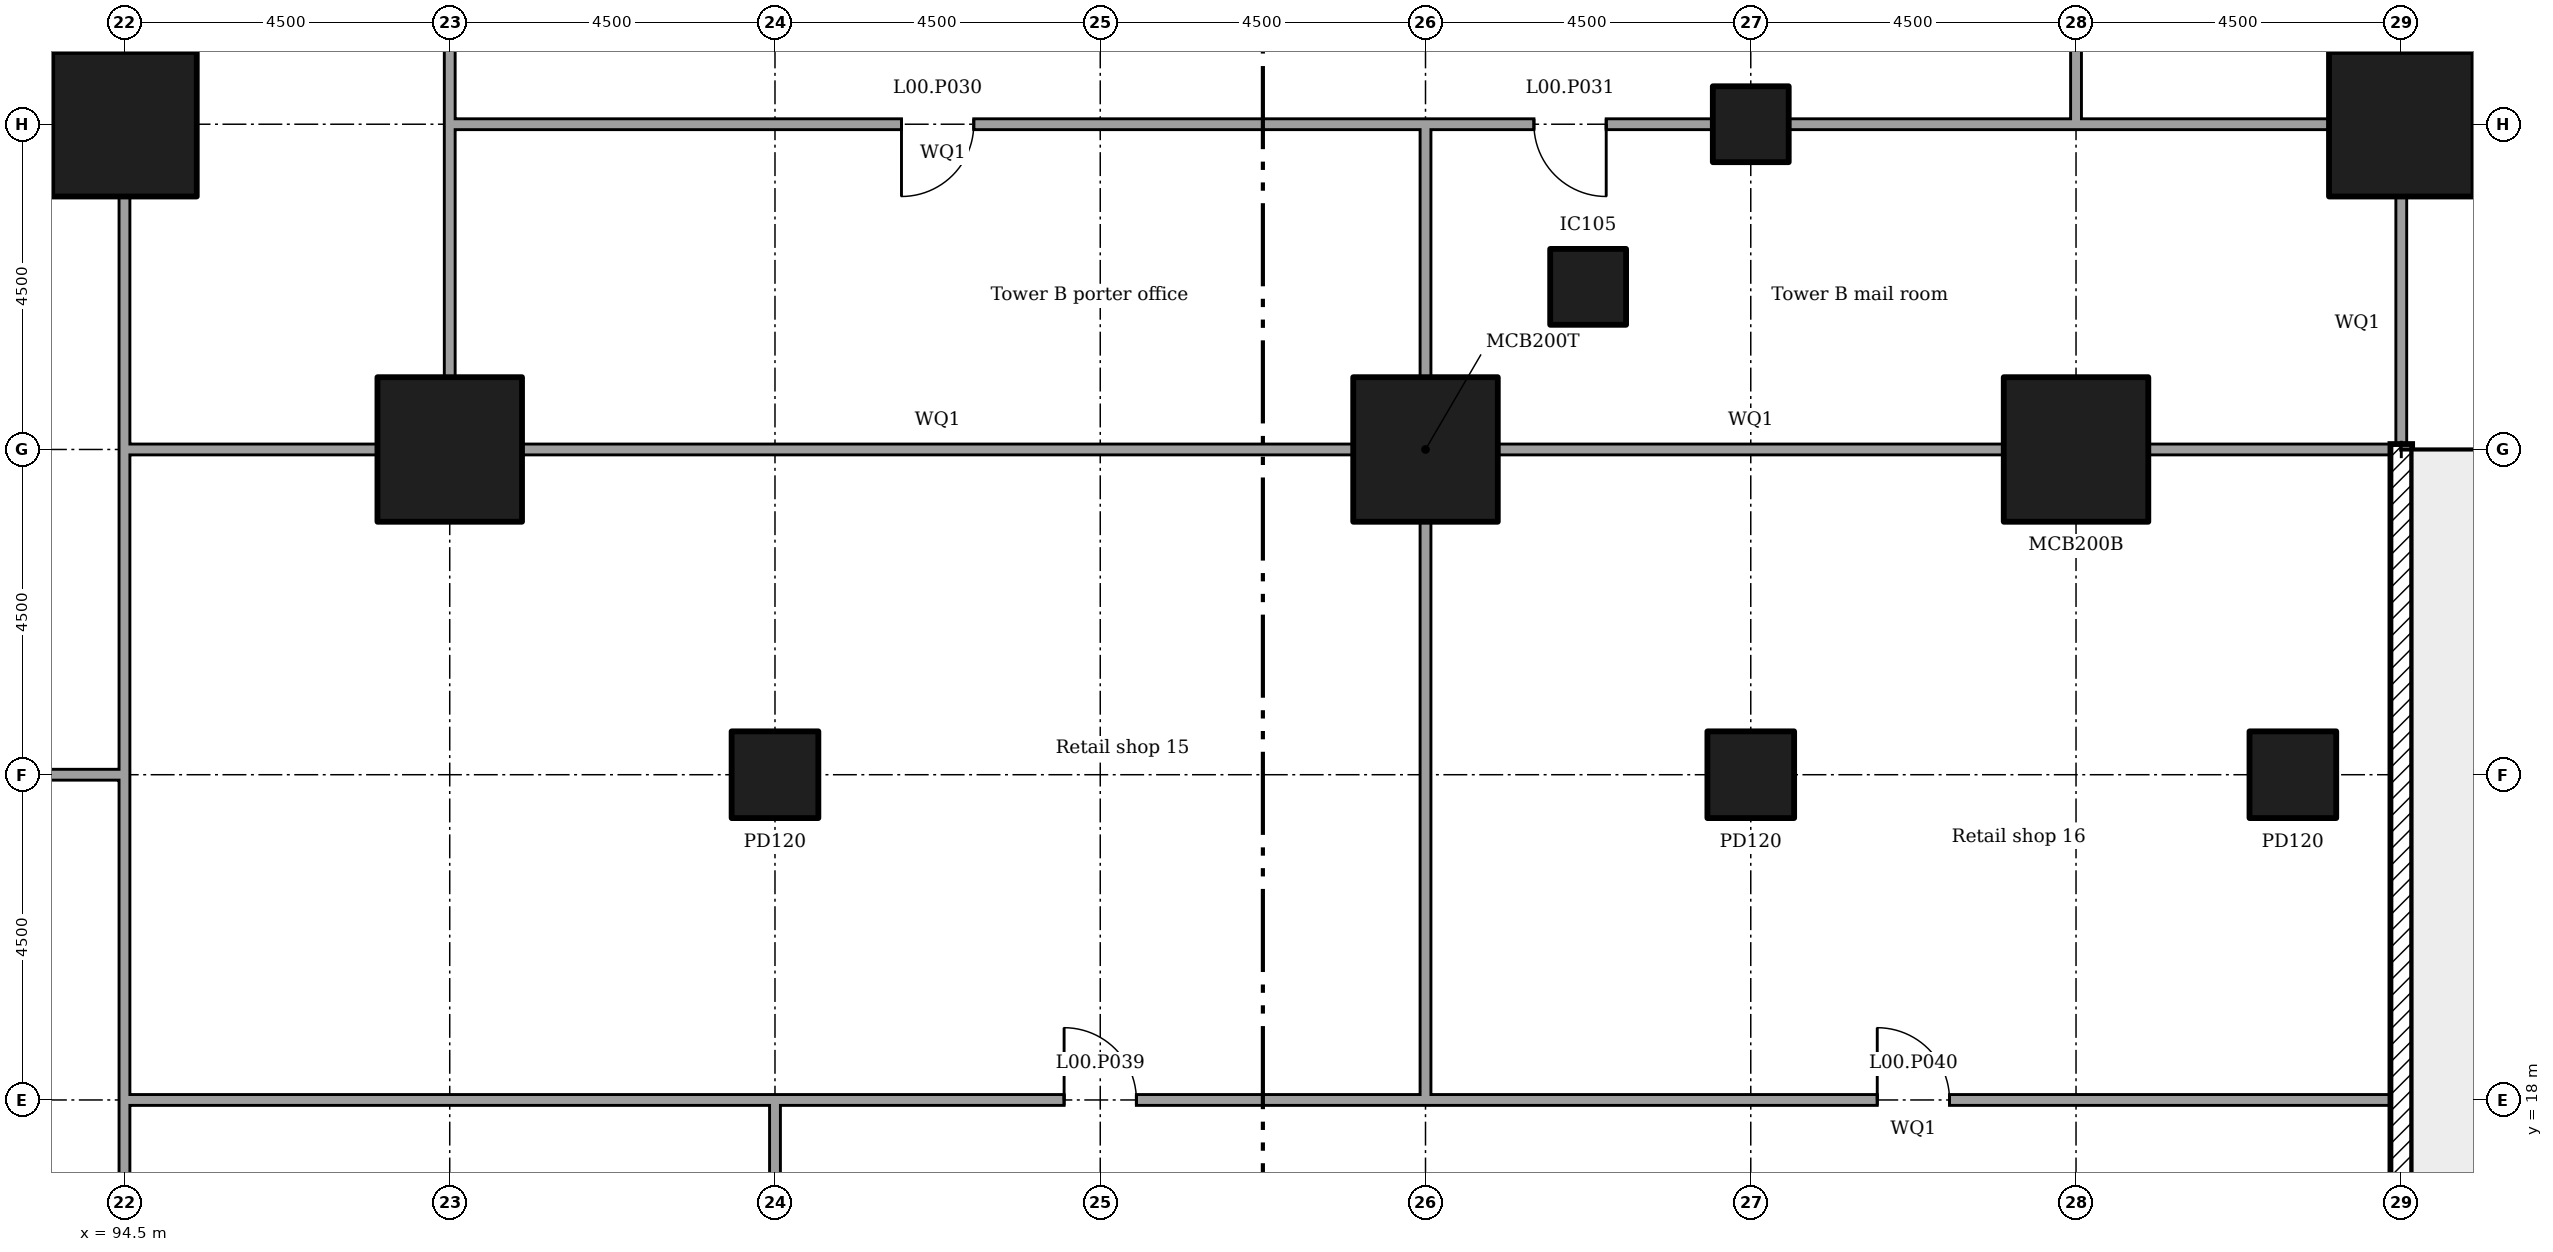
"""IFC4 building model, lengths in metres.
Left out: names, types, materials, properties, quantities, classifications, styles, units other than length and angle.
Written with IfcOpenShell. Run it as: python <this file> out.ifc"""

import sys

from ifc_helpers import new_model, si_unit, direction, frame, frame_2d, origin, origin_2d, place, context, subcontext, project, spatial, rectangle, extrude, element, fill, save


model = new_model("IFC4")
c1 = context("Model", 3, precision=1e-05, world=origin(), true_north=direction((0.0, 1.0)))
c2 = subcontext(c1, "Body", "Model", "MODEL_VIEW")
j1 = project(units=[si_unit("LENGTHUNIT", "METRE"), si_unit("PLANEANGLEUNIT", "RADIAN")], contexts=[c1])
p1 = place(None, origin())
s1 = spatial("IfcSite", under=j1, at=p1, CompositionType="ELEMENT")
p2 = place(p1, origin())
s2 = spatial("IfcBuilding", under=s1, at=p2, CompositionType="ELEMENT")
p3 = place(p2, origin())
s3 = spatial("IfcBuildingStorey", under=s2, at=p3, CompositionType="ELEMENT", Elevation=0.0)
for number, where in (
    (1, (94.5, 31.5, 0.0)),
    (2, (99.0, 27.0, 0.0)),
    (3, (112.5, 27.0, 0.0)),
    (4, (121.5, 27.0, 0.0)),
    (5, (126.0, 31.5, 0.0)),
):
    element("IfcColumn", number, at=place(p3, frame(where)), inside=s3, PredefinedType="COLUMN", context=c2, shape_type="SweptSolid", body=[
        extrude(rectangle(XDim=2.0, YDim=2.0, at=origin_2d()), origin(), (0.0, 0.0, 1.0), 6.0),
    ])
for number, where in (
    (6, (114.75, 29.25, 0.0)),
    (7, (117.0, 31.5, 0.0)),
):
    element("IfcColumn", number, at=place(p3, frame(where)), inside=s3, PredefinedType="COLUMN", context=c2, shape_type="SweptSolid", body=[
        extrude(rectangle(XDim=1.05, YDim=1.05, at=origin_2d()), origin(), (0.0, 0.0, 1.0), 6.0),
    ])
for number, where in (
    (8, (103.5, 22.5, 0.0)),
    (9, (117.0, 22.5, 0.0)),
    (10, (124.5, 22.5, 0.0)),
):
    element("IfcColumn", number, at=place(p3, frame(where)), inside=s3, PredefinedType="COLUMN", context=c2, shape_type="SweptSolid", body=[
        extrude(rectangle(XDim=1.2, YDim=1.2, at=origin_2d()), origin(), (0.0, 0.0, 1.0), 6.0),
    ])
p4 = place(p3, frame((90.595, 22.5, 0.0)))
e11 = element("IfcWall", 11, at=p4, inside=s3, PredefinedType="PARTITIONING", context=c2, shape_type="SweptSolid", body=[
    extrude(rectangle(XDim=3.98, YDim=0.15, at=frame_2d((1.99, 0.0))), origin(), (0.0, 0.0, 1.0), 5.55),
])
p5 = place(p3, frame((94.5, 9.0, 0.0), z_axis=(0.0, 0.0, 1.0), x_axis=(0.0, 1.0, 0.0)))
e12 = element("IfcWall", 12, at=p5, inside=s3, PredefinedType="PARTITIONING", context=c2, shape_type="SweptSolid", body=[
    extrude(rectangle(XDim=9.075, YDim=0.15, at=frame_2d((4.538, 0.0))), origin(), (0.0, 0.0, 1.0), 5.55),
])
p6 = place(p5, frame((4.0, 0.0, 0.0)))
e13 = element("IfcOpeningElement", 13, at=p6, cuts=e12, PredefinedType="OPENING", context=c2, shape_type="SweptSolid", body=[
    extrude(rectangle(XDim=1.0, YDim=2.1, at=frame_2d((0.5, 1.05))), frame((0.0, 0.085, 0.0), z_axis=(0.0, -1.0, 0.0), x_axis=(1.0, 0.0, 0.0)), (0.0, 0.0, 1.0), 0.17),
])
p7 = place(p3, frame((94.5, 18.0, 0.0), z_axis=(0.0, 0.0, 1.0), x_axis=(0.0, 1.0, 0.0)))
e14 = element("IfcWall", 14, at=p7, inside=s3, PredefinedType="PARTITIONING", context=c2, shape_type="SweptSolid", body=[
    extrude(rectangle(XDim=4.425, YDim=0.15, at=frame_2d((2.212, 0.0))), origin(), (0.0, 0.0, 1.0), 5.55),
])
p8 = place(p3, frame((94.5, 26.925, 0.0), z_axis=(0.0, 0.0, 1.0), x_axis=(0.0, 1.0, 0.0)))
e15 = element("IfcWall", 15, at=p8, inside=s3, PredefinedType="PARTITIONING", context=c2, shape_type="SweptSolid", body=[
    extrude(rectangle(XDim=3.58, YDim=0.15, at=frame_2d((1.79, 0.0))), origin(), (0.0, 0.0, 1.0), 5.55),
])
p9 = place(p3, frame((94.5, 32.495, 0.0), z_axis=(0.0, 0.0, 1.0), x_axis=(0.0, 1.0, 0.0)))
e16 = element("IfcWall", 16, at=p9, inside=s3, PredefinedType="PARTITIONING", context=c2, shape_type="SweptSolid", body=[
    extrude(rectangle(XDim=11.51, YDim=0.15, at=frame_2d((5.755, 0.0))), origin(), (0.0, 0.0, 1.0), 5.55),
])
p10 = place(p9, frame((4.85, 0.0, 0.0)))
e17 = element("IfcOpeningElement", 17, at=p10, cuts=e16, PredefinedType="OPENING", context=c2, shape_type="SweptSolid", body=[
    extrude(rectangle(XDim=1.8, YDim=2.1, at=frame_2d((0.9, 1.05))), frame((0.0, 0.085, 0.0), z_axis=(0.0, -1.0, 0.0), x_axis=(1.0, 0.0, 0.0)), (0.0, 0.0, 1.0), 0.17),
])
p11 = place(p3, frame((94.5, 22.5, 0.0), z_axis=(0.0, 0.0, 1.0), x_axis=(0.0, 1.0, 0.0)))
e18 = element("IfcWall", 18, at=p11, inside=s3, PredefinedType="PARTITIONING", context=c2, shape_type="SweptSolid", body=[
    extrude(rectangle(XDim=4.5, YDim=0.15, at=frame_2d((2.25, 0.0))), origin(), (0.0, 0.0, 1.0), 5.55),
])
p12 = place(p3, frame((99.0, 31.425, 0.0), z_axis=(0.0, 0.0, 1.0), x_axis=(0.0, 1.0, 0.0)))
e19 = element("IfcWall", 19, at=p12, inside=s3, PredefinedType="PARTITIONING", context=c2, shape_type="SweptSolid", body=[
    extrude(rectangle(XDim=4.055, YDim=0.15, at=frame_2d((2.027, 0.0))), origin(), (0.0, 0.0, 1.0), 5.55),
])
p13 = place(p12, frame((1.175, 0.0, 0.0)))
e20 = element("IfcOpeningElement", 20, at=p13, cuts=e19, PredefinedType="OPENING", context=c2, shape_type="SweptSolid", body=[
    extrude(rectangle(XDim=1.8, YDim=2.1, at=frame_2d((0.9, 1.05))), frame((0.0, 0.085, 0.0), z_axis=(0.0, -1.0, 0.0), x_axis=(1.0, 0.0, 0.0)), (0.0, 0.0, 1.0), 0.17),
])
p14 = place(p3, frame((99.0, 27.995, 0.0), z_axis=(0.0, 0.0, 1.0), x_axis=(0.0, 1.0, 0.0)))
e21 = element("IfcWall", 21, at=p14, inside=s3, PredefinedType="PARTITIONING", context=c2, shape_type="SweptSolid", body=[
    extrude(rectangle(XDim=3.505, YDim=0.15, at=frame_2d((1.752, 0.0))), origin(), (0.0, 0.0, 1.0), 5.55),
])
p15 = place(p3, frame((94.575, 27.0, 0.0)))
e22 = element("IfcWall", 22, at=p15, inside=s3, PredefinedType="PARTITIONING", context=c2, shape_type="SweptSolid", body=[
    extrude(rectangle(XDim=3.43, YDim=0.15, at=frame_2d((1.715, 0.0))), origin(), (0.0, 0.0, 1.0), 5.55),
])
p16 = place(p3, frame((99.075, 31.5, 0.0)))
e23 = element("IfcWall", 23, at=p16, inside=s3, PredefinedType="PARTITIONING", context=c2, shape_type="SweptSolid", body=[
    extrude(rectangle(XDim=13.5, YDim=0.15, at=frame_2d((6.75, 0.0))), origin(), (0.0, 0.0, 1.0), 5.55),
])
p17 = place(p16, frame((6.175, 0.0, 0.0)))
e24 = element("IfcOpeningElement", 24, at=p17, cuts=e23, PredefinedType="OPENING", context=c2, shape_type="SweptSolid", body=[
    extrude(rectangle(XDim=1.0, YDim=2.1, at=frame_2d((0.5, 1.05))), frame((0.0, 0.085, 0.0), z_axis=(0.0, -1.0, 0.0), x_axis=(1.0, 0.0, 0.0)), (0.0, 0.0, 1.0), 0.17),
])
p18 = place(p3, frame((112.5, 31.5, 0.0)))
e25 = element("IfcWall", 25, at=p18, inside=s3, PredefinedType="PARTITIONING", context=c2, shape_type="SweptSolid", body=[
    extrude(rectangle(XDim=3.98, YDim=0.15, at=frame_2d((1.99, 0.0))), origin(), (0.0, 0.0, 1.0), 5.55),
])
p19 = place(p18, frame((1.5, 0.0, 0.0)))
e26 = element("IfcOpeningElement", 26, at=p19, cuts=e25, PredefinedType="OPENING", context=c2, shape_type="SweptSolid", body=[
    extrude(rectangle(XDim=1.0, YDim=2.1, at=frame_2d((0.5, 1.05))), frame((0.0, 0.085, 0.0), z_axis=(0.0, -1.0, 0.0), x_axis=(1.0, 0.0, 0.0)), (0.0, 0.0, 1.0), 0.17),
])
p20 = place(p3, frame((117.52, 31.5, 0.0)))
e27 = element("IfcWall", 27, at=p20, inside=s3, PredefinedType="PARTITIONING", context=c2, shape_type="SweptSolid", body=[
    extrude(rectangle(XDim=4.055, YDim=0.15, at=frame_2d((2.027, 0.0))), origin(), (0.0, 0.0, 1.0), 5.55),
])
p21 = place(p3, frame((121.5, 31.575, 0.0), z_axis=(0.0, 0.0, 1.0), x_axis=(0.0, 1.0, 0.0)))
e28 = element("IfcWall", 28, at=p21, inside=s3, PredefinedType="PARTITIONING", context=c2, shape_type="SweptSolid", body=[
    extrude(rectangle(XDim=9.0, YDim=0.15, at=frame_2d((4.5, 0.0))), origin(), (0.0, 0.0, 1.0), 5.55),
])
p22 = place(p21, frame((3.925, 0.0, 0.0)))
e29 = element("IfcOpeningElement", 29, at=p22, cuts=e28, PredefinedType="OPENING", context=c2, shape_type="SweptSolid", body=[
    extrude(rectangle(XDim=1.0, YDim=2.1, at=frame_2d((0.5, 1.05))), frame((0.0, 0.085, 0.0), z_axis=(0.0, -1.0, 0.0), x_axis=(1.0, 0.0, 0.0)), (0.0, 0.0, 1.0), 0.17),
])
p23 = place(p3, frame((112.5, 27.995, 0.0), z_axis=(0.0, 0.0, 1.0), x_axis=(0.0, 1.0, 0.0)))
e30 = element("IfcWall", 30, at=p23, inside=s3, PredefinedType="PARTITIONING", context=c2, shape_type="SweptSolid", body=[
    extrude(rectangle(XDim=3.43, YDim=0.15, at=frame_2d((1.715, 0.0))), origin(), (0.0, 0.0, 1.0), 5.55),
])
p24 = place(p3, frame((99.995, 27.0, 0.0)))
e31 = element("IfcWall", 31, at=p24, inside=s3, PredefinedType="PARTITIONING", context=c2, shape_type="SweptSolid", body=[
    extrude(rectangle(XDim=11.51, YDim=0.15, at=frame_2d((5.755, 0.0))), origin(), (0.0, 0.0, 1.0), 5.55),
])
p25 = place(p3, frame((121.5, 31.5, 0.0)))
e32 = element("IfcWall", 32, at=p25, inside=s3, PredefinedType="PARTITIONING", context=c2, shape_type="SweptSolid", body=[
    extrude(rectangle(XDim=3.505, YDim=0.15, at=frame_2d((1.752, 0.0))), origin(), (0.0, 0.0, 1.0), 5.55),
])
p26 = place(p3, frame((113.495, 27.0, 0.0)))
e33 = element("IfcWall", 33, at=p26, inside=s3, PredefinedType="PARTITIONING", context=c2, shape_type="SweptSolid", body=[
    extrude(rectangle(XDim=7.01, YDim=0.15, at=frame_2d((3.505, 0.0))), origin(), (0.0, 0.0, 1.0), 5.55),
])
p27 = place(p3, frame((122.495, 27.0, 0.0)))
e34 = element("IfcWall", 34, at=p27, inside=s3, PredefinedType="PARTITIONING", context=c2, shape_type="SweptSolid", body=[
    extrude(rectangle(XDim=3.355, YDim=0.15, at=frame_2d((1.677, 0.0))), origin(), (0.0, 0.0, 1.0), 5.55),
])
p28 = place(p3, frame((126.0, 27.0, 0.0), z_axis=(0.0, 0.0, 1.0), x_axis=(0.0, 1.0, 0.0)))
e35 = element("IfcWall", 35, at=p28, inside=s3, PredefinedType="PARTITIONING", context=c2, shape_type="SweptSolid", body=[
    extrude(rectangle(XDim=3.505, YDim=0.15, at=frame_2d((1.752, 0.0))), origin(), (0.0, 0.0, 1.0), 5.55),
])
p29 = place(p3, frame((126.0, 32.495, 0.0), z_axis=(0.0, 0.0, 1.0), x_axis=(0.0, 1.0, 0.0)))
e36 = element("IfcWall", 36, at=p29, inside=s3, PredefinedType="PARTITIONING", context=c2, shape_type="SweptSolid", body=[
    extrude(rectangle(XDim=7.93, YDim=0.15, at=frame_2d((3.965, 0.0))), origin(), (0.0, 0.0, 1.0), 5.55),
])
p30 = place(p3, frame((103.5, 9.595, 0.0), z_axis=(0.0, 0.0, 1.0), x_axis=(0.0, 1.0, 0.0)))
e37 = element("IfcWall", 37, at=p30, inside=s3, PredefinedType="PARTITIONING", context=c2, shape_type="SweptSolid", body=[
    extrude(rectangle(XDim=8.48, YDim=0.15, at=frame_2d((4.24, 0.0))), origin(), (0.0, 0.0, 1.0), 5.55),
])
p31 = place(p3, frame((94.575, 18.0, 0.0)))
e38 = element("IfcWall", 38, at=p31, inside=s3, PredefinedType="PARTITIONING", context=c2, shape_type="SweptSolid", body=[
    extrude(rectangle(XDim=8.85, YDim=0.15, at=frame_2d((4.425, 0.0))), origin(), (0.0, 0.0, 1.0), 5.55),
])
p32 = place(p3, frame((103.5, 18.0, 0.0)))
e39 = element("IfcWall", 39, at=p32, inside=s3, PredefinedType="PARTITIONING", context=c2, shape_type="SweptSolid", body=[
    extrude(rectangle(XDim=9.075, YDim=0.15, at=frame_2d((4.538, 0.0))), origin(), (0.0, 0.0, 1.0), 5.55),
])
p33 = place(p32, frame((4.0, 0.0, 0.0)))
e40 = element("IfcOpeningElement", 40, at=p33, cuts=e39, PredefinedType="OPENING", context=c2, shape_type="SweptSolid", body=[
    extrude(rectangle(XDim=1.0, YDim=2.1, at=frame_2d((0.5, 1.05))), frame((0.0, 0.085, 0.0), z_axis=(0.0, -1.0, 0.0), x_axis=(1.0, 0.0, 0.0)), (0.0, 0.0, 1.0), 0.17),
])
p34 = place(p3, frame((112.5, 18.0, 0.0)))
e41 = element("IfcWall", 41, at=p34, inside=s3, PredefinedType="PARTITIONING", context=c2, shape_type="SweptSolid", body=[
    extrude(rectangle(XDim=13.5, YDim=0.15, at=frame_2d((6.75, 0.0))), origin(), (0.0, 0.0, 1.0), 5.55),
])
p35 = place(p34, frame((6.25, 0.0, 0.0)))
e42 = element("IfcOpeningElement", 42, at=p35, cuts=e41, PredefinedType="OPENING", context=c2, shape_type="SweptSolid", body=[
    extrude(rectangle(XDim=1.0, YDim=2.1, at=frame_2d((0.5, 1.05))), frame((0.0, 0.085, 0.0), z_axis=(0.0, -1.0, 0.0), x_axis=(1.0, 0.0, 0.0)), (0.0, 0.0, 1.0), 0.17),
])
p36 = place(p3, frame((112.5, 18.075, 0.0), z_axis=(0.0, 0.0, 1.0), x_axis=(0.0, 1.0, 0.0)))
e43 = element("IfcWall", 43, at=p36, inside=s3, PredefinedType="PARTITIONING", context=c2, shape_type="SweptSolid", body=[
    extrude(rectangle(XDim=7.93, YDim=0.15, at=frame_2d((3.965, 0.0))), origin(), (0.0, 0.0, 1.0), 5.55),
])
p37 = place(p3, frame((126.0, 1.5, 0.0), z_axis=(0.0, 0.0, 1.0), x_axis=(0.0, 1.0, 0.0)))
e44 = element("IfcWall", 44, at=p37, inside=s3, PredefinedType="SOLIDWALL", context=c2, shape_type="SweptSolid", body=[
    extrude(rectangle(XDim=25.575, YDim=0.3, at=frame_2d((12.788, 0.0))), origin(), (0.0, 0.0, 1.0), 1.1),
])
p38 = place(p17, frame((1.0, 0.0, 0.0), x_axis=(-1.0, 0.0, 0.0)))
e45 = element("IfcDoor", 45, at=p38, inside=s3, OperationType="SINGLE_SWING_LEFT", PredefinedType="DOOR", context=c2, shape_type="SweptSolid", body=[
    extrude(rectangle(XDim=1.0, YDim=2.1, at=frame_2d((0.5, 1.05))), frame((0.0, 0.025, 0.0), z_axis=(0.0, -1.0, 0.0), x_axis=(1.0, 0.0, 0.0)), (0.0, 0.0, 1.0), 0.05),
])
fill(e24, e45)
p39 = place(p19, frame((1.0, 0.0, 0.0), x_axis=(-1.0, 0.0, 0.0)))
e46 = element("IfcDoor", 46, at=p39, inside=s3, OperationType="SINGLE_SWING_RIGHT", PredefinedType="DOOR", context=c2, shape_type="SweptSolid", body=[
    extrude(rectangle(XDim=1.0, YDim=2.1, at=frame_2d((0.5, 1.05))), frame((0.0, 0.025, 0.0), z_axis=(0.0, -1.0, 0.0), x_axis=(1.0, 0.0, 0.0)), (0.0, 0.0, 1.0), 0.05),
])
fill(e26, e46)
p40 = place(p33, origin())
e47 = element("IfcDoor", 47, at=p40, inside=s3, OperationType="SINGLE_SWING_RIGHT", PredefinedType="DOOR", context=c2, shape_type="SweptSolid", body=[
    extrude(rectangle(XDim=1.0, YDim=2.1, at=frame_2d((0.5, 1.05))), frame((0.0, 0.025, 0.0), z_axis=(0.0, -1.0, 0.0), x_axis=(1.0, 0.0, 0.0)), (0.0, 0.0, 1.0), 0.05),
])
fill(e40, e47)
p41 = place(p35, origin())
e48 = element("IfcDoor", 48, at=p41, inside=s3, OperationType="SINGLE_SWING_RIGHT", PredefinedType="DOOR", context=c2, shape_type="SweptSolid", body=[
    extrude(rectangle(XDim=1.0, YDim=2.1, at=frame_2d((0.5, 1.05))), frame((0.0, 0.025, 0.0), z_axis=(0.0, -1.0, 0.0), x_axis=(1.0, 0.0, 0.0)), (0.0, 0.0, 1.0), 0.05),
])
fill(e42, e48)
save(model, sys.argv[1])
